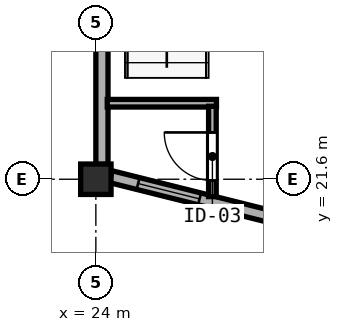
"""IFC4 building model, lengths in metres.
Left out: names, types, materials, properties, quantities, classifications, styles, units other than length and angle.
Written with IfcOpenShell. Run it as: python <this file> out.ifc"""

import sys

from ifc_helpers import new_model, si_unit, direction, frame, frame_2d, origin, origin_2d, place, context, subcontext, project, spatial, rectangle, hollow_rectangle, extrude, element, fill, save


model = new_model("IFC4")
c1 = context("Model", 3, precision=1e-05, world=origin(), true_north=direction((0.0, 1.0)))
c2 = subcontext(c1, "Body", "Model", "MODEL_VIEW")
j1 = project(units=[si_unit("LENGTHUNIT", "METRE"), si_unit("PLANEANGLEUNIT", "RADIAN")], contexts=[c1])
p1 = place(None, origin())
s1 = spatial("IfcSite", under=j1, at=p1, CompositionType="ELEMENT")
p2 = place(p1, origin())
s2 = spatial("IfcBuilding", under=s1, at=p2, CompositionType="ELEMENT")
p3 = place(p2, frame((0.0, 0.0, 318.2)))
s3 = spatial("IfcBuildingStorey", under=s2, at=p3, CompositionType="ELEMENT", Elevation=318.2)
p4 = place(p3, frame((24.0, 21.6, 0.0), z_axis=(0.0, 0.0, 1.0), x_axis=(1.0, 0.0, 0.0)))
e1 = element("IfcColumn", 1, at=p4, inside=s3, PredefinedType="COLUMN", context=c2, shape_type="SweptSolid", body=[
    extrude(hollow_rectangle(XDim=0.6, YDim=0.6, WallThickness=0.024, at=origin_2d()), origin(), (0.0, 0.0, 1.0), 5.0),
])
p5 = place(p3, frame((24.12, 27.308, 0.0), z_axis=(0.0, 0.0, 1.0), x_axis=(0.0, -1.0, 0.0)))
e2 = element("IfcWall", 2, at=p5, inside=s3, PredefinedType="SOLIDWALL", context=c2, shape_type="SweptSolid", body=[
    extrude(rectangle(XDim=5.416, YDim=0.24, at=frame_2d((2.708, 0.0))), origin(), (0.0, 0.0, 1.0), 4.355),
])
p6 = place(p5, frame((0.7, 0.0, 0.85)))
e3 = element("IfcOpeningElement", 3, at=p6, cuts=e2, PredefinedType="OPENING", context=c2, shape_type="SweptSolid", body=[
    extrude(rectangle(XDim=1.25, YDim=1.95, at=frame_2d((0.625, 0.975))), frame((0.0, 0.13, 0.0), z_axis=(0.0, -1.0, 0.0), x_axis=(1.0, 0.0, 0.0)), (0.0, 0.0, 1.0), 0.26),
])
p7 = place(p3, frame((24.292, 21.651, 0.0), z_axis=(0.0, 0.0, 1.0), x_axis=(0.970142500145, -0.242535625036, 0.0)))
e4 = element("IfcWall", 4, at=p7, inside=s3, PredefinedType="SOLIDWALL", context=c2, shape_type="SweptSolid", body=[
    extrude(rectangle(XDim=4.887, YDim=0.24, at=frame_2d((2.444, 0.0))), origin(), (0.0, 0.0, 1.0), 4.355),
])
p8 = place(p7, frame((0.559, 0.0, 0.85)))
e5 = element("IfcOpeningElement", 5, at=p8, cuts=e4, PredefinedType="OPENING", context=c2, shape_type="SweptSolid", body=[
    extrude(rectangle(XDim=1.25, YDim=1.95, at=frame_2d((0.625, 0.975))), frame((0.0, 0.13, 0.0), z_axis=(0.0, -1.0, 0.0), x_axis=(1.0, 0.0, 0.0)), (0.0, 0.0, 1.0), 0.26),
])
p9 = place(p3, frame((24.225, 23.1, 0.0), z_axis=(0.0, 0.0, 1.0), x_axis=(1.0, 0.0, 0.0)))
e6 = element("IfcWall", 6, at=p9, inside=s3, PredefinedType="PARTITIONING", context=c2, shape_type="SweptSolid", body=[
    extrude(rectangle(XDim=2.155, YDim=0.15, at=frame_2d((1.077, 0.0))), origin(), (0.0, 0.0, 1.0), 4.76),
])
p10 = place(p3, frame((26.3, 21.257, 0.0), z_axis=(0.0, 0.0, 1.0), x_axis=(0.0, 1.0, 0.0)))
e7 = element("IfcWall", 7, at=p10, inside=s3, PredefinedType="PARTITIONING", context=c2, shape_type="SweptSolid", body=[
    extrude(rectangle(XDim=1.783, YDim=0.15, at=frame_2d((0.892, 0.0))), origin(), (0.0, 0.0, 1.0), 4.76),
])
p11 = place(p10, frame((1.267, 0.0, 0.0), z_axis=(0.0, 0.0, 1.0), x_axis=(-1.0, 0.0, 0.0)))
e8 = element("IfcOpeningElement", 8, at=p11, cuts=e7, PredefinedType="OPENING", context=c2, shape_type="SweptSolid", body=[
    extrude(rectangle(XDim=0.95, YDim=2.12, at=frame_2d((0.475, 1.06))), frame((0.0, 0.085, 0.0), z_axis=(0.0, -1.0, 0.0), x_axis=(1.0, 0.0, 0.0)), (0.0, 0.0, 1.0), 0.17),
])
p12 = place(p8, origin())
e9 = element("IfcWindow", 9, at=p12, inside=s3, PartitioningType="SINGLE_PANEL", PredefinedType="WINDOW", context=c2, shape_type="SweptSolid", body=[
    extrude(rectangle(XDim=1.25, YDim=1.95, at=frame_2d((0.625, 0.975))), frame((0.0, 0.03, 0.0), z_axis=(0.0, -1.0, 0.0), x_axis=(1.0, 0.0, 0.0)), (0.0, 0.0, 1.0), 0.06),
])
fill(e5, e9)
p13 = place(p11, origin())
e10 = element("IfcDoor", 10, at=p13, inside=s3, OperationType="SINGLE_SWING_LEFT", PredefinedType="DOOR", context=c2, shape_type="SweptSolid", body=[
    extrude(rectangle(XDim=0.95, YDim=2.12, at=frame_2d((0.475, 1.06))), frame((0.0, 0.025, 0.0), z_axis=(0.0, -1.0, 0.0), x_axis=(1.0, 0.0, 0.0)), (0.0, 0.0, 1.0), 0.05),
])
fill(e8, e10)
save(model, sys.argv[1])
